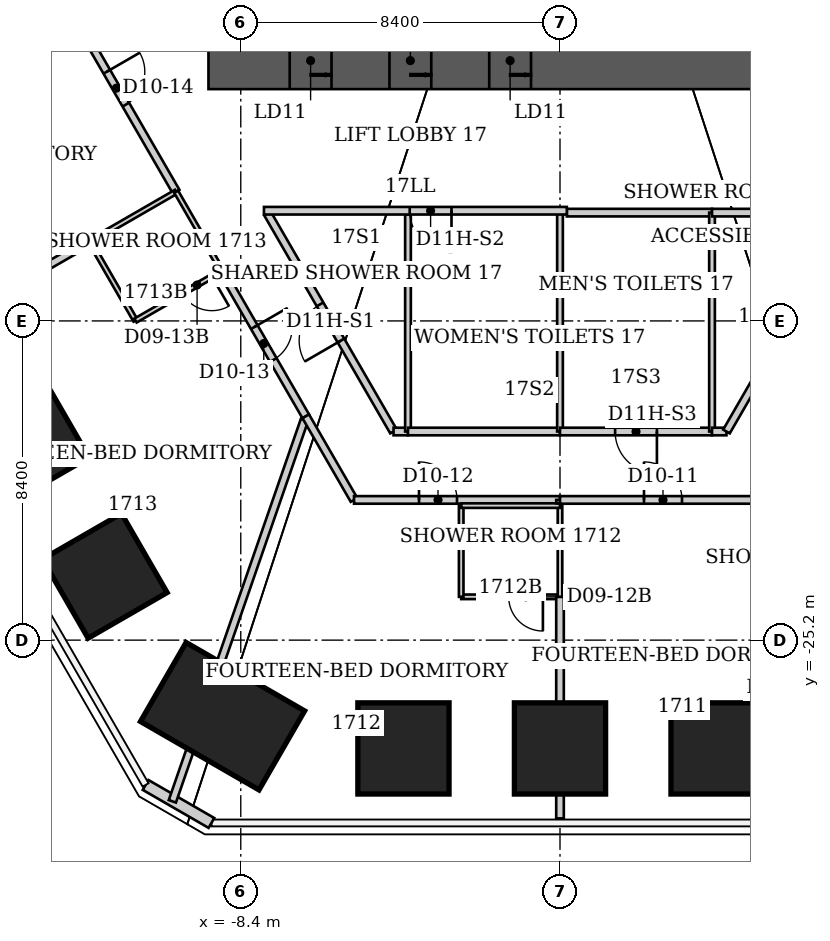
"""IFC4 building model, lengths in metres.
Left out: names, types, materials, properties, quantities, classifications, styles, units other than length and angle.
Written with IfcOpenShell. Run it as: python <this file> out.ifc"""

import sys

from ifc_helpers import new_model, si_unit, direction, frame, frame_2d, origin, origin_2d, place, context, subcontext, project, spatial, rectangle, extrude, element, fill, save


model = new_model("IFC4")
c1 = context("Model", 3, precision=1e-05, world=origin(), true_north=direction((0.0, 1.0)))
c2 = subcontext(c1, "Body", "Model", "MODEL_VIEW")
j1 = project(units=[si_unit("LENGTHUNIT", "METRE"), si_unit("PLANEANGLEUNIT", "RADIAN")], contexts=[c1])
p1 = place(None, origin())
s1 = spatial("IfcSite", under=j1, at=p1, CompositionType="ELEMENT")
p2 = place(p1, origin())
s2 = spatial("IfcBuilding", under=s1, at=p2, CompositionType="ELEMENT")
p3 = place(p2, frame((0.0, 0.0, 72.4)))
s3 = spatial("IfcBuildingStorey", under=s2, at=p3, CompositionType="ELEMENT", Elevation=72.4)
p4 = place(p3, frame((4.119, -28.05, 0.0), z_axis=(-0.006738664901, 0.045822921324, 0.998926849312), x_axis=(-0.00011331945, -0.9989495591, 0.045823198629)))
e1 = element("IfcColumn", 1, at=p4, inside=s3, PredefinedType="COLUMN", context=c2, shape_type="SweptSolid", body=[
    extrude(rectangle(XDim=2.4, YDim=2.4, at=origin_2d()), origin(), (0.0, 0.0, 1.0), 3.804),
])
p5 = place(p3, frame((0.0, -28.05, 0.0), z_axis=(0.0, 0.04588800593, 0.99894659062), x_axis=(0.0, -0.99894659062, 0.04588800593)))
e2 = element("IfcColumn", 2, at=p5, inside=s3, PredefinedType="COLUMN", context=c2, shape_type="SweptSolid", body=[
    extrude(rectangle(XDim=2.4, YDim=2.4, at=origin_2d()), origin(), (0.0, 0.0, 1.0), 3.804),
])
p6 = place(p3, frame((-4.119, -28.05, 0.0), z_axis=(0.006738664901, 0.045822921324, 0.998926849312), x_axis=(0.00011331945, -0.9989495591, 0.045823198629)))
e3 = element("IfcColumn", 3, at=p6, inside=s3, PredefinedType="COLUMN", context=c2, shape_type="SweptSolid", body=[
    extrude(rectangle(XDim=2.4, YDim=2.4, at=origin_2d()), origin(), (0.0, 0.0, 1.0), 3.804),
])
p7 = place(p3, frame((-8.879, -27.202, 0.0), z_axis=(0.014824030832, 0.0454346919, 0.998857315577), x_axis=(-0.499731843942, -0.864917167509, 0.046758715743)))
e4 = element("IfcColumn", 4, at=p7, inside=s3, PredefinedType="COLUMN", context=c2, shape_type="SweptSolid", body=[
    extrude(rectangle(XDim=2.4, YDim=3.6, at=origin_2d()), origin(), (0.0, 0.0, 1.0), 3.804),
])
p8 = place(p3, frame((-11.978, -23.509, 0.0), z_axis=(0.019833251954, 0.038960465812, 0.999043905052), x_axis=(-0.865703965576, -0.49921248457, 0.036654320816)))
e5 = element("IfcColumn", 5, at=p8, inside=s3, PredefinedType="COLUMN", context=c2, shape_type="SweptSolid", body=[
    extrude(rectangle(XDim=2.4, YDim=2.4, at=origin_2d()), origin(), (0.0, 0.0, 1.0), 3.804),
])
p9 = place(p3, frame((-14.031, -19.953, 0.0), z_axis=(0.02330242081, 0.033124102308, 0.999179558954), x_axis=(-0.865853874056, -0.498946587993, 0.036733787066)))
e6 = element("IfcColumn", 6, at=p9, inside=s3, PredefinedType="COLUMN", context=c2, shape_type="SweptSolid", body=[
    extrude(rectangle(XDim=2.4, YDim=2.4, at=origin_2d()), origin(), (0.0, 0.0, 1.0), 3.803),
])
p10 = place(p3, frame((-9.25, -9.95, 0.0), z_axis=(0.0, 0.0, 1.0), x_axis=(1.0, 0.0, 0.0)))
e7 = element("IfcWall", 7, at=p10, inside=s3, PredefinedType="SHEAR", context=c2, shape_type="SweptSolid", body=[
    extrude(rectangle(XDim=18.5, YDim=1.5, at=frame_2d((9.25, 0.0))), origin(), (0.0, 0.0, 1.0), 3.8),
])
p11 = place(p10, frame((2.137, 0.0, 0.0)))
e8 = element("IfcOpeningElement", 8, at=p11, cuts=e7, PredefinedType="OPENING", context=c2, shape_type="SweptSolid", body=[
    extrude(rectangle(XDim=1.1, YDim=2.1, at=frame_2d((0.55, 1.05))), frame((0.0, 0.75, 0.0), z_axis=(0.0, -1.0, 0.0), x_axis=(1.0, 0.0, 0.0)), (0.0, 0.0, 1.0), 1.5),
])
p12 = place(p10, frame((4.762, 0.0, 0.0)))
e9 = element("IfcOpeningElement", 9, at=p12, cuts=e7, PredefinedType="OPENING", context=c2, shape_type="SweptSolid", body=[
    extrude(rectangle(XDim=1.1, YDim=2.1, at=frame_2d((0.55, 1.05))), frame((0.0, 0.75, 0.0), z_axis=(0.0, -1.0, 0.0), x_axis=(1.0, 0.0, 0.0)), (0.0, 0.0, 1.0), 1.5),
])
p13 = place(p10, frame((7.387, 0.0, 0.0)))
e10 = element("IfcOpeningElement", 10, at=p13, cuts=e7, PredefinedType="OPENING", context=c2, shape_type="SweptSolid", body=[
    extrude(rectangle(XDim=1.1, YDim=2.1, at=frame_2d((0.55, 1.05))), frame((0.0, 0.75, 0.0), z_axis=(0.0, -1.0, 0.0), x_axis=(1.0, 0.0, 0.0)), (0.0, 0.0, 1.0), 1.5),
])
p14 = place(p3, frame((-9.172, -30.011, 0.0), z_axis=(0.0, 0.0, 1.0), x_axis=(-0.866010750942, 0.50002537861, 0.0)))
e11 = element("IfcWall", 11, at=p14, inside=s3, PredefinedType="SOLIDWALL", context=c2, shape_type="SweptSolid", body=[
    extrude(rectangle(XDim=2.0, YDim=0.3, at=frame_2d((1.0, 0.0))), origin(), (0.0, 0.0, 1.0), 3.64),
])
p15 = place(p3, frame((-17.356, -17.59, 0.0), z_axis=(0.0, 0.0, 1.0), x_axis=(0.865929957466, 0.500165281445, 0.0)))
e12 = element("IfcWall", 12, at=p15, inside=s3, PredefinedType="PARTITIONING", context=c2, shape_type="SweptSolid", body=[
    extrude(rectangle(XDim=5.758, YDim=0.2, at=frame_2d((2.879, 0.0))), origin(), (0.0, 0.0, 1.0), 3.64),
])
p16 = place(p3, frame((-13.25, -7.95, 0.0), z_axis=(0.0, 0.0, 1.0), x_axis=(0.500447534468, -0.865766865412, 0.0)))
e13 = element("IfcWall", 13, at=p16, inside=s3, PredefinedType="PARTITIONING", context=c2, shape_type="SweptSolid", body=[
    extrude(rectangle(XDim=6.295, YDim=0.2, at=frame_2d((3.147, 0.0))), origin(), (0.0, 0.0, 1.0), 3.64),
])
p17 = place(p16, frame((2.647, 0.0, 0.0)))
e14 = element("IfcOpeningElement", 14, at=p17, cuts=e13, PredefinedType="OPENING", context=c2, shape_type="SweptSolid", body=[
    extrude(rectangle(XDim=1.0, YDim=2.13, at=frame_2d((0.5, 1.065))), frame((0.0, 0.1, 0.0), z_axis=(0.0, -1.0, 0.0), x_axis=(1.0, 0.0, 0.0)), (0.0, 0.0, 1.0), 0.2),
])
p18 = place(p3, frame((-12.37, -14.71, 0.0), z_axis=(0.0, 0.0, 1.0), x_axis=(0.499769390944, -0.866158505053, 0.0)))
e15 = element("IfcWall", 15, at=p18, inside=s3, PredefinedType="PARTITIONING", context=c2, shape_type="SweptSolid", body=[
    extrude(rectangle(XDim=2.402, YDim=0.12, at=frame_2d((1.201, 0.0))), origin(), (0.0, 0.0, 1.0), 3.64),
])
p19 = place(p3, frame((-12.37, -14.71, 0.0), z_axis=(0.0, 0.0, 1.0), x_axis=(0.866114241029, 0.499846097802, 0.0)))
e16 = element("IfcWall", 16, at=p19, inside=s3, PredefinedType="PARTITIONING", context=c2, shape_type="SweptSolid", body=[
    extrude(rectangle(XDim=2.621, YDim=0.12, at=frame_2d((1.311, 0.0))), origin(), (0.0, 0.0, 1.0), 3.64),
])
p20 = place(p3, frame((-11.17, -16.79, 0.0), z_axis=(0.0, 0.0, 1.0), x_axis=(0.866114241029, 0.499846097802, 0.0)))
e17 = element("IfcWall", 17, at=p20, inside=s3, PredefinedType="PARTITIONING", context=c2, shape_type="SweptSolid", body=[
    extrude(rectangle(XDim=2.621, YDim=0.12, at=frame_2d((1.311, 0.0))), origin(), (0.0, 0.0, 1.0), 3.64),
])
p21 = place(p20, frame((1.421, 0.0, 0.0)))
e18 = element("IfcOpeningElement", 18, at=p21, cuts=e17, PredefinedType="OPENING", context=c2, shape_type="SweptSolid", body=[
    extrude(rectangle(XDim=0.9, YDim=2.03, at=frame_2d((0.45, 1.015))), frame((0.0, 0.06, 0.0), z_axis=(0.0, -1.0, 0.0), x_axis=(1.0, 0.0, 0.0)), (0.0, 0.0, 1.0), 0.12),
])
p22 = place(p3, frame((-10.2, -29.442, 0.0), z_axis=(0.0, 0.0, 1.0), x_axis=(0.327375786306, 0.944894223996, 0.0)))
e19 = element("IfcWall", 19, at=p22, inside=s3, PredefinedType="PARTITIONING", context=c2, shape_type="SweptSolid", body=[
    extrude(rectangle(XDim=10.623, YDim=0.2, at=frame_2d((5.311, 0.0))), origin(), (0.0, 0.0, 1.0), 3.64),
])
p23 = place(p3, frame((-10.1, -13.4, 0.0), z_axis=(0.0, 0.0, 1.0), x_axis=(0.499769390944, -0.866158505053, 0.0)))
e20 = element("IfcWall", 20, at=p23, inside=s3, PredefinedType="PARTITIONING", context=c2, shape_type="SweptSolid", body=[
    extrude(rectangle(XDim=2.402, YDim=0.12, at=frame_2d((1.201, 0.0))), origin(), (0.0, 0.0, 1.0), 3.64),
])
p24 = place(p3, frame((-8.9, -15.48, 0.0), z_axis=(0.0, 0.0, 1.0), x_axis=(0.499773435832, -0.866156171159, 0.0)))
e21 = element("IfcWall", 21, at=p24, inside=s3, PredefinedType="PARTITIONING", context=c2, shape_type="SweptSolid", body=[
    extrude(rectangle(XDim=4.422, YDim=0.2, at=frame_2d((2.211, 0.0))), origin(), (0.0, 0.0, 1.0), 3.64),
])
p25 = place(p24, frame((1.711, 0.0, 0.0)))
e22 = element("IfcOpeningElement", 22, at=p25, cuts=e21, PredefinedType="OPENING", context=c2, shape_type="SweptSolid", body=[
    extrude(rectangle(XDim=1.0, YDim=2.13, at=frame_2d((0.5, 1.065))), frame((0.0, 0.1, 0.0), z_axis=(0.0, -1.0, 0.0), x_axis=(1.0, 0.0, 0.0)), (0.0, 0.0, 1.0), 0.2),
])
p26 = place(p3, frame((-6.69, -19.31, 0.0), z_axis=(0.0, 0.0, 1.0), x_axis=(0.499963722229, -0.866046347752, 0.0)))
e23 = element("IfcWall", 23, at=p26, inside=s3, PredefinedType="PARTITIONING", context=c2, shape_type="SweptSolid", body=[
    extrude(rectangle(XDim=2.54, YDim=0.2, at=frame_2d((1.27, 0.0))), origin(), (0.0, 0.0, 1.0), 3.64),
])
p27 = place(p3, frame((-5.42, -21.51, 0.0), z_axis=(0.0, 0.0, 1.0), x_axis=(1.0, 0.0, 0.0)))
e24 = element("IfcWall", 24, at=p27, inside=s3, PredefinedType="PARTITIONING", context=c2, shape_type="SweptSolid", body=[
    extrude(rectangle(XDim=5.42, YDim=0.2, at=frame_2d((2.71, 0.0))), origin(), (0.0, 0.0, 1.0), 3.64),
])
p28 = place(p27, frame((1.71, 0.0, 0.0)))
e25 = element("IfcOpeningElement", 25, at=p28, cuts=e24, PredefinedType="OPENING", context=c2, shape_type="SweptSolid", body=[
    extrude(rectangle(XDim=1.0, YDim=2.13, at=frame_2d((0.5, 1.065))), frame((0.0, 0.1, 0.0), z_axis=(0.0, -1.0, 0.0), x_axis=(1.0, 0.0, 0.0)), (0.0, 0.0, 1.0), 0.2),
])
p29 = place(p3, frame((-4.38, -19.71, 0.0), z_axis=(0.0, 0.0, 1.0), x_axis=(-0.500523653757, 0.865722860984, 0.0)))
e26 = element("IfcWall", 26, at=p29, inside=s3, PredefinedType="PARTITIONING", context=c2, shape_type="SweptSolid", body=[
    extrude(rectangle(XDim=6.628, YDim=0.2, at=frame_2d((3.314, 0.0))), origin(), (0.0, 0.0, 1.0), 3.64),
])
p30 = place(p29, frame((2.764, 0.0, 0.0)))
e27 = element("IfcOpeningElement", 27, at=p30, cuts=e26, PredefinedType="OPENING", context=c2, shape_type="SweptSolid", body=[
    extrude(rectangle(XDim=1.1, YDim=2.2, at=frame_2d((0.55, 1.1))), frame((0.0, 0.1, 0.0), z_axis=(0.0, -1.0, 0.0), x_axis=(1.0, 0.0, 0.0)), (0.0, 0.0, 1.0), 0.2),
])
p31 = place(p3, frame((-4.0, -19.71, 0.0), z_axis=(0.0, 0.0, 1.0), x_axis=(-1.0, 0.0, 0.0)))
e28 = element("IfcWall", 28, at=p31, inside=s3, PredefinedType="PARTITIONING", context=c2, shape_type="SweptSolid", body=[
    extrude(rectangle(XDim=0.38, YDim=0.2, at=frame_2d((0.19, 0.0))), origin(), (0.0, 0.0, 1.0), 3.64),
])
p32 = place(p3, frame((-4.0, -14.0, 0.0), z_axis=(0.0, 0.0, 1.0), x_axis=(0.0, -1.0, 0.0)))
e29 = element("IfcWall", 29, at=p32, inside=s3, PredefinedType="PARTITIONING", context=c2, shape_type="SweptSolid", body=[
    extrude(rectangle(XDim=5.71, YDim=0.15, at=frame_2d((2.855, 0.0))), origin(), (0.0, 0.0, 1.0), 2.878),
])
p33 = place(p3, frame((-2.6, -24.06, 0.0), z_axis=(0.0, 0.0, 1.0), x_axis=(1.0, 0.0, 0.0)))
e30 = element("IfcWall", 30, at=p33, inside=s3, PredefinedType="PARTITIONING", context=c2, shape_type="SweptSolid", body=[
    extrude(rectangle(XDim=2.6, YDim=0.12, at=frame_2d((1.3, 0.0))), origin(), (0.0, 0.0, 1.0), 3.64),
])
p34 = place(p33, frame((1.25, 0.0, 0.0)))
e31 = element("IfcOpeningElement", 31, at=p34, cuts=e30, PredefinedType="OPENING", context=c2, shape_type="SweptSolid", body=[
    extrude(rectangle(XDim=0.9, YDim=2.03, at=frame_2d((0.45, 1.015))), frame((0.0, 0.06, 0.0), z_axis=(0.0, -1.0, 0.0), x_axis=(1.0, 0.0, 0.0)), (0.0, 0.0, 1.0), 0.12),
])
p35 = place(p3, frame((-2.6, -21.66, 0.0), z_axis=(0.0, 0.0, 1.0), x_axis=(0.0, -1.0, 0.0)))
e32 = element("IfcWall", 32, at=p35, inside=s3, PredefinedType="PARTITIONING", context=c2, shape_type="SweptSolid", body=[
    extrude(rectangle(XDim=2.4, YDim=0.12, at=frame_2d((1.2, 0.0))), origin(), (0.0, 0.0, 1.0), 3.64),
])
p36 = place(p3, frame((0.0, -29.89, 0.0), z_axis=(0.0, 0.0, 1.0), x_axis=(0.0, 1.0, 0.0)))
e33 = element("IfcWall", 33, at=p36, inside=s3, PredefinedType="PARTITIONING", context=c2, shape_type="SweptSolid", body=[
    extrude(rectangle(XDim=5.83, YDim=0.2, at=frame_2d((2.915, 0.0))), origin(), (0.0, 0.0, 1.0), 2.86),
])
p37 = place(p3, frame((0.0, -24.06, 0.0), z_axis=(0.0, 0.0, 1.0), x_axis=(0.0, 1.0, 0.0)))
e34 = element("IfcWall", 34, at=p37, inside=s3, PredefinedType="PARTITIONING", context=c2, shape_type="SweptSolid", body=[
    extrude(rectangle(XDim=2.4, YDim=0.12, at=frame_2d((1.2, 0.0))), origin(), (0.0, 0.0, 1.0), 2.86),
])
p38 = place(p3, frame((0.0, -21.66, 0.0), z_axis=(0.0, 0.0, 1.0), x_axis=(-1.0, 0.0, 0.0)))
e35 = element("IfcWall", 35, at=p38, inside=s3, PredefinedType="PARTITIONING", context=c2, shape_type="SweptSolid", body=[
    extrude(rectangle(XDim=2.6, YDim=0.12, at=frame_2d((1.3, 0.0))), origin(), (0.0, 0.0, 1.0), 3.64),
])
p39 = place(p3, frame((0.0, -21.6, 0.0), z_axis=(0.0, 0.0, 1.0), x_axis=(0.0, 1.0, 0.0)))
e36 = element("IfcWall", 36, at=p39, inside=s3, PredefinedType="PARTITIONING", context=c2, shape_type="SweptSolid", body=[
    extrude(rectangle(XDim=0.09, YDim=0.2, at=frame_2d((0.045, 0.0))), origin(), (0.0, 0.0, 1.0), 3.64),
])
p40 = place(p3, frame((0.0, -21.51, 0.0), z_axis=(0.0, 0.0, 1.0), x_axis=(1.0, 0.0, 0.0)))
e37 = element("IfcWall", 37, at=p40, inside=s3, PredefinedType="PARTITIONING", context=c2, shape_type="SweptSolid", body=[
    extrude(rectangle(XDim=5.42, YDim=0.2, at=frame_2d((2.71, 0.0))), origin(), (0.0, 0.0, 1.0), 3.64),
])
p41 = place(p40, frame((2.21, 0.0, 0.0)))
e38 = element("IfcOpeningElement", 38, at=p41, cuts=e37, PredefinedType="OPENING", context=c2, shape_type="SweptSolid", body=[
    extrude(rectangle(XDim=1.0, YDim=2.13, at=frame_2d((0.5, 1.065))), frame((0.0, 0.1, 0.0), z_axis=(0.0, -1.0, 0.0), x_axis=(1.0, 0.0, 0.0)), (0.0, 0.0, 1.0), 0.2),
])
p42 = place(p3, frame((0.0, -19.71, 0.0), z_axis=(0.0, 0.0, 1.0), x_axis=(-1.0, 0.0, 0.0)))
e39 = element("IfcWall", 39, at=p42, inside=s3, PredefinedType="PARTITIONING", context=c2, shape_type="SweptSolid", body=[
    extrude(rectangle(XDim=4.0, YDim=0.2, at=frame_2d((2.0, 0.0))), origin(), (0.0, 0.0, 1.0), 3.64),
])
p43 = place(p3, frame((0.0, -13.95, 0.0), z_axis=(0.0, 0.0, 1.0), x_axis=(0.0, -1.0, 0.0)))
e40 = element("IfcWall", 40, at=p43, inside=s3, PredefinedType="PARTITIONING", context=c2, shape_type="SweptSolid", body=[
    extrude(rectangle(XDim=5.76, YDim=0.15, at=frame_2d((2.88, 0.0))), origin(), (0.0, 0.0, 1.0), 2.86),
])
p44 = place(p3, frame((0.18, -13.95, 0.0), z_axis=(0.0, 0.0, 1.0), x_axis=(1.0, 0.0, 0.0)))
e41 = element("IfcWall", 41, at=p44, inside=s3, PredefinedType="PARTITIONING", context=c2, shape_type="SweptSolid", body=[
    extrude(rectangle(XDim=3.82, YDim=0.2, at=frame_2d((1.91, 0.0))), origin(), (0.0, 0.0, 1.0), 3.64),
])
p45 = place(p3, frame((0.18, -13.9, 0.0), z_axis=(0.0, 0.0, 1.0), x_axis=(-1.0, 0.0, 0.0)))
e42 = element("IfcWall", 42, at=p45, inside=s3, PredefinedType="PARTITIONING", context=c2, shape_type="SweptSolid", body=[
    extrude(rectangle(XDim=7.97, YDim=0.2, at=frame_2d((3.985, 0.0))), origin(), (0.0, 0.0, 1.0), 3.64),
])
p46 = place(p45, frame((3.035, 0.0, 0.0)))
e43 = element("IfcOpeningElement", 43, at=p46, cuts=e42, PredefinedType="OPENING", context=c2, shape_type="SweptSolid", body=[
    extrude(rectangle(XDim=1.1, YDim=2.2, at=frame_2d((0.55, 1.1))), frame((0.0, 0.1, 0.0), z_axis=(0.0, -1.0, 0.0), x_axis=(1.0, 0.0, 0.0)), (0.0, 0.0, 1.0), 0.2),
])
p47 = place(p3, frame((4.0, -19.71, 0.0), z_axis=(0.0, 0.0, 1.0), x_axis=(-1.0, 0.0, 0.0)))
e44 = element("IfcWall", 44, at=p47, inside=s3, PredefinedType="PARTITIONING", context=c2, shape_type="SweptSolid", body=[
    extrude(rectangle(XDim=4.0, YDim=0.2, at=frame_2d((2.0, 0.0))), origin(), (0.0, 0.0, 1.0), 3.64),
])
p48 = place(p47, frame((1.45, 0.0, 0.0)))
e45 = element("IfcOpeningElement", 45, at=p48, cuts=e44, PredefinedType="OPENING", context=c2, shape_type="SweptSolid", body=[
    extrude(rectangle(XDim=1.1, YDim=2.2, at=frame_2d((0.55, 1.1))), frame((0.0, 0.1, 0.0), z_axis=(0.0, -1.0, 0.0), x_axis=(1.0, 0.0, 0.0)), (0.0, 0.0, 1.0), 0.2),
])
p49 = place(p3, frame((4.0, -13.95, 0.0), z_axis=(0.0, 0.0, 1.0), x_axis=(0.0, -1.0, 0.0)))
e46 = element("IfcWall", 46, at=p49, inside=s3, PredefinedType="PARTITIONING", context=c2, shape_type="SweptSolid", body=[
    extrude(rectangle(XDim=5.76, YDim=0.15, at=frame_2d((2.88, 0.0))), origin(), (0.0, 0.0, 1.0), 2.878),
])
p50 = place(p3, frame((4.0, -13.95, 0.0), z_axis=(0.0, 0.0, 1.0), x_axis=(1.0, 0.0, 0.0)))
e47 = element("IfcWall", 47, at=p50, inside=s3, PredefinedType="PARTITIONING", context=c2, shape_type="SweptSolid", body=[
    extrude(rectangle(XDim=3.635, YDim=0.2, at=frame_2d((1.817, 0.0))), origin(), (0.0, 0.0, 1.0), 3.64),
])
p51 = place(p3, frame((4.38, -19.71, 0.0), z_axis=(0.0, 0.0, 1.0), x_axis=(-1.0, 0.0, 0.0)))
e48 = element("IfcWall", 48, at=p51, inside=s3, PredefinedType="PARTITIONING", context=c2, shape_type="SweptSolid", body=[
    extrude(rectangle(XDim=0.38, YDim=0.2, at=frame_2d((0.19, 0.0))), origin(), (0.0, 0.0, 1.0), 3.64),
])
p52 = place(p3, frame((7.71, -13.95, 0.0), z_axis=(0.0, 0.0, 1.0), x_axis=(-0.500511113963, -0.865730110831, 0.0)))
e49 = element("IfcWall", 49, at=p52, inside=s3, PredefinedType="PARTITIONING", context=c2, shape_type="SweptSolid", body=[
    extrude(rectangle(XDim=6.653, YDim=0.2, at=frame_2d((3.327, 0.0))), origin(), (0.0, 0.0, 1.0), 3.64),
])
p53 = place(p52, frame((2.777, 0.0, 0.0)))
e50 = element("IfcOpeningElement", 50, at=p53, cuts=e49, PredefinedType="OPENING", context=c2, shape_type="SweptSolid", body=[
    extrude(rectangle(XDim=1.1, YDim=2.2, at=frame_2d((0.55, 1.1))), frame((0.0, 0.1, 0.0), z_axis=(0.0, -1.0, 0.0), x_axis=(1.0, 0.0, 0.0)), (0.0, 0.0, 1.0), 0.2),
])
p54 = place(p41, origin())
e51 = element("IfcDoor", 51, at=p54, inside=s3, OperationType="SINGLE_SWING_LEFT", PredefinedType="DOOR", context=c2, shape_type="SweptSolid", body=[
    extrude(rectangle(XDim=1.0, YDim=2.13, at=frame_2d((0.5, 1.065))), frame((0.0, 0.025, 0.0), z_axis=(0.0, -1.0, 0.0), x_axis=(1.0, 0.0, 0.0)), (0.0, 0.0, 1.0), 0.05),
])
fill(e38, e51)
p55 = place(p28, origin())
e52 = element("IfcDoor", 52, at=p55, inside=s3, OperationType="SINGLE_SWING_LEFT", PredefinedType="DOOR", context=c2, shape_type="SweptSolid", body=[
    extrude(rectangle(XDim=1.0, YDim=2.13, at=frame_2d((0.5, 1.065))), frame((0.0, 0.025, 0.0), z_axis=(0.0, -1.0, 0.0), x_axis=(1.0, 0.0, 0.0)), (0.0, 0.0, 1.0), 0.05),
])
fill(e25, e52)
p56 = place(p34, origin())
e53 = element("IfcDoor", 53, at=p56, inside=s3, OperationType="SINGLE_SWING_RIGHT", PredefinedType="DOOR", context=c2, shape_type="SweptSolid", body=[
    extrude(rectangle(XDim=0.9, YDim=2.03, at=frame_2d((0.45, 1.015))), frame((0.0, 0.025, 0.0), z_axis=(0.0, -1.0, 0.0), x_axis=(1.0, 0.0, 0.0)), (0.0, 0.0, 1.0), 0.05),
])
fill(e31, e53)
p57 = place(p25, origin())
e54 = element("IfcDoor", 54, at=p57, inside=s3, OperationType="SINGLE_SWING_LEFT", PredefinedType="DOOR", context=c2, shape_type="SweptSolid", body=[
    extrude(rectangle(XDim=1.0, YDim=2.13, at=frame_2d((0.5, 1.065))), frame((0.0, 0.025, 0.0), z_axis=(0.0, -1.0, 0.0), x_axis=(1.0, 0.0, 0.0)), (0.0, 0.0, 1.0), 0.05),
])
fill(e22, e54)
p58 = place(p21, origin())
e55 = element("IfcDoor", 55, at=p58, inside=s3, OperationType="SINGLE_SWING_RIGHT", PredefinedType="DOOR", context=c2, shape_type="SweptSolid", body=[
    extrude(rectangle(XDim=0.9, YDim=2.03, at=frame_2d((0.45, 1.015))), frame((0.0, 0.025, 0.0), z_axis=(0.0, -1.0, 0.0), x_axis=(1.0, 0.0, 0.0)), (0.0, 0.0, 1.0), 0.05),
])
fill(e18, e55)
p59 = place(p17, origin())
e56 = element("IfcDoor", 56, at=p59, inside=s3, OperationType="SINGLE_SWING_LEFT", PredefinedType="DOOR", context=c2, shape_type="SweptSolid", body=[
    extrude(rectangle(XDim=1.0, YDim=2.13, at=frame_2d((0.5, 1.065))), frame((0.0, 0.025, 0.0), z_axis=(0.0, -1.0, 0.0), x_axis=(1.0, 0.0, 0.0)), (0.0, 0.0, 1.0), 0.05),
])
fill(e14, e56)
p60 = place(p30, origin())
e57 = element("IfcDoor", 57, at=p60, inside=s3, OperationType="SINGLE_SWING_LEFT", PredefinedType="DOOR", context=c2, shape_type="SweptSolid", body=[
    extrude(rectangle(XDim=1.1, YDim=2.2, at=frame_2d((0.55, 1.1))), frame((0.0, 0.025, 0.0), z_axis=(0.0, -1.0, 0.0), x_axis=(1.0, 0.0, 0.0)), (0.0, 0.0, 1.0), 0.05),
])
fill(e27, e57)
p61 = place(p46, origin())
e58 = element("IfcDoor", 58, at=p61, inside=s3, OperationType="SINGLE_SWING_LEFT", PredefinedType="DOOR", context=c2, shape_type="SweptSolid", body=[
    extrude(rectangle(XDim=1.1, YDim=2.2, at=frame_2d((0.55, 1.1))), frame((0.0, 0.025, 0.0), z_axis=(0.0, -1.0, 0.0), x_axis=(1.0, 0.0, 0.0)), (0.0, 0.0, 1.0), 0.05),
])
fill(e43, e58)
p62 = place(p48, origin())
e59 = element("IfcDoor", 59, at=p62, inside=s3, OperationType="SINGLE_SWING_LEFT", PredefinedType="DOOR", context=c2, shape_type="SweptSolid", body=[
    extrude(rectangle(XDim=1.1, YDim=2.2, at=frame_2d((0.55, 1.1))), frame((0.0, 0.025, 0.0), z_axis=(0.0, -1.0, 0.0), x_axis=(1.0, 0.0, 0.0)), (0.0, 0.0, 1.0), 0.05),
])
fill(e45, e59)
p63 = place(p11, origin())
e60 = element("IfcDoor", 60, at=p63, inside=s3, OperationType="DOUBLE_DOOR_SLIDING", PredefinedType="DOOR", context=c2, shape_type="SweptSolid", body=[
    extrude(rectangle(XDim=1.1, YDim=2.1, at=frame_2d((0.55, 1.05))), frame((0.0, 0.025, 0.0), z_axis=(0.0, -1.0, 0.0), x_axis=(1.0, 0.0, 0.0)), (0.0, 0.0, 1.0), 0.05),
])
fill(e8, e60)
p64 = place(p12, origin())
e61 = element("IfcDoor", 61, at=p64, inside=s3, OperationType="DOUBLE_DOOR_SLIDING", PredefinedType="DOOR", context=c2, shape_type="SweptSolid", body=[
    extrude(rectangle(XDim=1.1, YDim=2.1, at=frame_2d((0.55, 1.05))), frame((0.0, 0.025, 0.0), z_axis=(0.0, -1.0, 0.0), x_axis=(1.0, 0.0, 0.0)), (0.0, 0.0, 1.0), 0.05),
])
fill(e9, e61)
p65 = place(p13, origin())
e62 = element("IfcDoor", 62, at=p65, inside=s3, OperationType="DOUBLE_DOOR_SLIDING", PredefinedType="DOOR", context=c2, shape_type="SweptSolid", body=[
    extrude(rectangle(XDim=1.1, YDim=2.1, at=frame_2d((0.55, 1.05))), frame((0.0, 0.025, 0.0), z_axis=(0.0, -1.0, 0.0), x_axis=(1.0, 0.0, 0.0)), (0.0, 0.0, 1.0), 0.05),
])
fill(e10, e62)
save(model, sys.argv[1])
